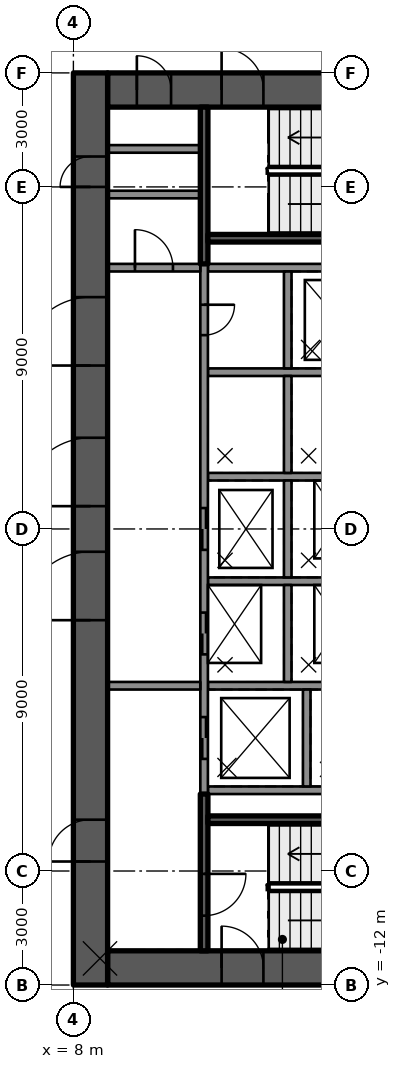
"""IFC4 building model, lengths in metres.
Left out: names, types, materials, properties, quantities, classifications, styles, units other than length and angle.
Written with IfcOpenShell. Run it as: python <this file> out.ifc"""

import sys

from ifc_helpers import new_model, si_unit, direction, frame, frame_2d, origin, place, context, subcontext, project, spatial, rectangle, extrude, element, fill, save


model = new_model("IFC4")
c1 = context("Model", 3, precision=1e-05, world=origin(), true_north=direction((0.0, 1.0)))
c2 = subcontext(c1, "Body", "Model", "MODEL_VIEW")
j1 = project(units=[si_unit("LENGTHUNIT", "METRE"), si_unit("PLANEANGLEUNIT", "RADIAN")], contexts=[c1])
p1 = place(None, origin())
s1 = spatial("IfcSite", under=j1, at=p1, CompositionType="ELEMENT")
p2 = place(p1, origin())
s2 = spatial("IfcBuilding", under=s1, at=p2, CompositionType="ELEMENT")
p3 = place(p2, frame((0.0, 0.0, 76.3)))
s3 = spatial("IfcBuildingStorey", under=s2, at=p3, CompositionType="ELEMENT", Elevation=76.3)
p4 = place(p3, frame((8.9, 11.55, 0.0), z_axis=(0.0, 0.0, 1.0), x_axis=(1.0, 0.0, 0.0)))
e1 = element("IfcWall", 1, at=p4, inside=s3, PredefinedType="SHEAR", context=c2, shape_type="SweptSolid", body=[
    extrude(rectangle(XDim=9.2, YDim=0.9, at=frame_2d((4.6, 0.0))), origin(), (0.0, 0.0, 1.0), 4.4),
])
p5 = place(p4, frame((3.0, 0.0, 0.0)))
e2 = element("IfcOpeningElement", 2, at=p5, cuts=e1, PredefinedType="OPENING", context=c2, shape_type="SweptSolid", body=[
    extrude(rectangle(XDim=1.1, YDim=2.1, at=frame_2d((0.55, 1.05))), frame((0.0, 0.46, 0.0), z_axis=(0.0, -1.0, 0.0), x_axis=(1.0, 0.0, 0.0)), (0.0, 0.0, 1.0), 0.92),
])
p6 = place(p4, frame((0.77, 0.0, 0.0)))
e3 = element("IfcOpeningElement", 3, at=p6, cuts=e1, PredefinedType="OPENING", context=c2, shape_type="SweptSolid", body=[
    extrude(rectangle(XDim=0.9, YDim=2.1, at=frame_2d((0.45, 1.05))), frame((0.0, 0.46, 0.0), z_axis=(0.0, -1.0, 0.0), x_axis=(1.0, 0.0, 0.0)), (0.0, 0.0, 1.0), 0.92),
])
p7 = place(p3, frame((8.9, -11.55, 0.0), z_axis=(0.0, 0.0, 1.0), x_axis=(1.0, 0.0, 0.0)))
e4 = element("IfcWall", 4, at=p7, inside=s3, PredefinedType="SHEAR", context=c2, shape_type="SweptSolid", body=[
    extrude(rectangle(XDim=9.2, YDim=0.9, at=frame_2d((4.6, 0.0))), origin(), (0.0, 0.0, 1.0), 4.4),
])
p8 = place(p7, frame((3.0, 0.0, 0.0)))
e5 = element("IfcOpeningElement", 5, at=p8, cuts=e4, PredefinedType="OPENING", context=c2, shape_type="SweptSolid", body=[
    extrude(rectangle(XDim=1.1, YDim=2.1, at=frame_2d((0.55, 1.05))), frame((0.0, 0.46, 0.0), z_axis=(0.0, -1.0, 0.0), x_axis=(1.0, 0.0, 0.0)), (0.0, 0.0, 1.0), 0.92),
])
p9 = place(p3, frame((8.45, -12.0, 0.0), z_axis=(0.0, 0.0, 1.0), x_axis=(0.0, 1.0, 0.0)))
e6 = element("IfcWall", 6, at=p9, inside=s3, PredefinedType="SHEAR", context=c2, shape_type="SweptSolid", body=[
    extrude(rectangle(XDim=24.0, YDim=0.9, at=frame_2d((12.0, 0.0))), origin(), (0.0, 0.0, 1.0), 4.4),
])
p10 = place(p9, frame((12.6, 0.0, 0.0)))
e7 = element("IfcOpeningElement", 7, at=p10, cuts=e6, PredefinedType="OPENING", context=c2, shape_type="SweptSolid", body=[
    extrude(rectangle(XDim=1.8, YDim=2.1, at=frame_2d((0.9, 1.05))), frame((0.0, 0.46, 0.0), z_axis=(0.0, -1.0, 0.0), x_axis=(1.0, 0.0, 0.0)), (0.0, 0.0, 1.0), 0.92),
])
p11 = place(p9, frame((16.3, 0.0, 0.0)))
e8 = element("IfcOpeningElement", 8, at=p11, cuts=e6, PredefinedType="OPENING", context=c2, shape_type="SweptSolid", body=[
    extrude(rectangle(XDim=1.8, YDim=2.1, at=frame_2d((0.9, 1.05))), frame((0.0, 0.46, 0.0), z_axis=(0.0, -1.0, 0.0), x_axis=(1.0, 0.0, 0.0)), (0.0, 0.0, 1.0), 0.92),
])
p12 = place(p9, frame((9.6, 0.0, 0.0)))
e9 = element("IfcOpeningElement", 9, at=p12, cuts=e6, PredefinedType="OPENING", context=c2, shape_type="SweptSolid", body=[
    extrude(rectangle(XDim=1.8, YDim=2.1, at=frame_2d((0.9, 1.05))), frame((0.0, 0.46, 0.0), z_axis=(0.0, -1.0, 0.0), x_axis=(1.0, 0.0, 0.0)), (0.0, 0.0, 1.0), 0.92),
])
p13 = place(p9, frame((3.25, 0.0, 0.0)))
e10 = element("IfcOpeningElement", 10, at=p13, cuts=e6, PredefinedType="OPENING", context=c2, shape_type="SweptSolid", body=[
    extrude(rectangle(XDim=1.1, YDim=2.1, at=frame_2d((0.55, 1.05))), frame((0.0, 0.46, 0.0), z_axis=(0.0, -1.0, 0.0), x_axis=(1.0, 0.0, 0.0)), (0.0, 0.0, 1.0), 0.92),
])
p14 = place(p9, frame((21.0, 0.0, 0.0)))
e11 = element("IfcOpeningElement", 11, at=p14, cuts=e6, PredefinedType="OPENING", context=c2, shape_type="SweptSolid", body=[
    extrude(rectangle(XDim=0.8, YDim=2.1, at=frame_2d((0.4, 1.05))), frame((0.0, 0.46, 0.0), z_axis=(0.0, -1.0, 0.0), x_axis=(1.0, 0.0, 0.0)), (0.0, 0.0, 1.0), 0.92),
])
for number, where, z_axis, x_axis in (
    (12, (11.54, -6.875, 0.0), (0.0, 0.0, 1.0), (1.0, 0.0, 0.0)),
    (13, (11.54, 6.875, 0.0), (0.0, 0.0, 1.0), (1.0, 0.0, 0.0)),
):
    element("IfcWall", number, at=place(p3, frame(where, z_axis=z_axis, x_axis=x_axis)), inside=s3, PredefinedType="SOLIDWALL", context=c2, shape_type="SweptSolid", body=[
        extrude(rectangle(XDim=6.56, YDim=0.2, at=frame_2d((3.28, 0.0))), origin(), (0.0, 0.0, 1.0), 3.99),
    ])
p15 = place(p3, frame((11.54, 4.125, 0.0), z_axis=(0.0, 0.0, 1.0), x_axis=(1.0, 0.0, 0.0)))
e14 = element("IfcWall", 14, at=p15, inside=s3, PredefinedType="SOLIDWALL", context=c2, shape_type="SweptSolid", body=[
    extrude(rectangle(XDim=4.7, YDim=0.2, at=frame_2d((2.35, 0.0))), origin(), (0.0, 0.0, 1.0), 3.99),
])
for number, where, z_axis, x_axis in (
    (15, (11.54, 1.375, 0.0), (0.0, 0.0, 1.0), (1.0, 0.0, 0.0)),
    (16, (11.54, -1.375, 0.0), (0.0, 0.0, 1.0), (1.0, 0.0, 0.0)),
):
    element("IfcWall", number, at=place(p3, frame(where, z_axis=z_axis, x_axis=x_axis)), inside=s3, PredefinedType="SOLIDWALL", context=c2, shape_type="SweptSolid", body=[
        extrude(rectangle(XDim=4.2, YDim=0.2, at=frame_2d((2.1, 0.0))), origin(), (0.0, 0.0, 1.0), 3.99),
    ])
p16 = place(p3, frame((11.54, -4.125, 0.0), z_axis=(0.0, 0.0, 1.0), x_axis=(1.0, 0.0, 0.0)))
e17 = element("IfcWall", 17, at=p16, inside=s3, PredefinedType="SOLIDWALL", context=c2, shape_type="SweptSolid", body=[
    extrude(rectangle(XDim=4.7, YDim=0.2, at=frame_2d((2.35, 0.0))), origin(), (0.0, 0.0, 1.0), 3.99),
])
p17 = place(p3, frame((11.44, 6.975, 0.0), z_axis=(0.0, 0.0, 1.0), x_axis=(0.0, -1.0, 0.0)))
e18 = element("IfcWall", 18, at=p17, inside=s3, PredefinedType="SOLIDWALL", context=c2, shape_type="SweptSolid", body=[
    extrude(rectangle(XDim=13.95, YDim=0.2, at=frame_2d((6.975, 0.0))), origin(), (0.0, 0.0, 1.0), 3.99),
])
p18 = place(p17, frame((6.425, 0.0, 0.0)))
e19 = element("IfcOpeningElement", 19, at=p18, cuts=e18, PredefinedType="OPENING", context=c2, shape_type="SweptSolid", body=[
    extrude(rectangle(XDim=1.1, YDim=2.1, at=frame_2d((0.55, 1.05))), frame((0.0, 0.11, 0.0), z_axis=(0.0, -1.0, 0.0), x_axis=(1.0, 0.0, 0.0)), (0.0, 0.0, 1.0), 0.22),
])
p19 = place(p17, frame((9.175, 0.0, 0.0)))
e20 = element("IfcOpeningElement", 20, at=p19, cuts=e18, PredefinedType="OPENING", context=c2, shape_type="SweptSolid", body=[
    extrude(rectangle(XDim=1.1, YDim=2.1, at=frame_2d((0.55, 1.05))), frame((0.0, 0.11, 0.0), z_axis=(0.0, -1.0, 0.0), x_axis=(1.0, 0.0, 0.0)), (0.0, 0.0, 1.0), 0.22),
])
p20 = place(p17, frame((11.925, 0.0, 0.0)))
e21 = element("IfcOpeningElement", 21, at=p20, cuts=e18, PredefinedType="OPENING", context=c2, shape_type="SweptSolid", body=[
    extrude(rectangle(XDim=1.1, YDim=2.1, at=frame_2d((0.55, 1.05))), frame((0.0, 0.11, 0.0), z_axis=(0.0, -1.0, 0.0), x_axis=(1.0, 0.0, 0.0)), (0.0, 0.0, 1.0), 0.22),
])
p21 = place(p17, frame((1.075, 0.0, 0.0)))
e22 = element("IfcOpeningElement", 22, at=p21, cuts=e18, PredefinedType="OPENING", context=c2, shape_type="SweptSolid", body=[
    extrude(rectangle(XDim=0.8, YDim=2.1, at=frame_2d((0.4, 1.05))), frame((0.0, 0.11, 0.0), z_axis=(0.0, -1.0, 0.0), x_axis=(1.0, 0.0, 0.0)), (0.0, 0.0, 1.0), 0.22),
])
for number, where, z_axis, x_axis in (
    (23, (13.64, 6.775, 0.0), (0.0, 0.0, 1.0), (0.0, -1.0, 0.0)),
    (24, (13.64, 4.025, 0.0), (0.0, 0.0, 1.0), (0.0, -1.0, 0.0)),
    (25, (13.64, 1.275, 0.0), (0.0, 0.0, 1.0), (0.0, -1.0, 0.0)),
    (26, (13.64, -1.475, 0.0), (0.0, 0.0, 1.0), (0.0, -1.0, 0.0)),
    (27, (14.14, -4.225, 0.0), (0.0, 0.0, 1.0), (0.0, -1.0, 0.0)),
):
    element("IfcWall", number, at=place(p3, frame(where, z_axis=z_axis, x_axis=x_axis)), inside=s3, PredefinedType="SOLIDWALL", context=c2, shape_type="SweptSolid", body=[
        extrude(rectangle(XDim=2.55, YDim=0.2, at=frame_2d((1.275, 0.0))), origin(), (0.0, 0.0, 1.0), 3.99),
    ])
p22 = place(p3, frame((11.44, -6.975, 0.0), z_axis=(0.0, 0.0, 1.0), x_axis=(0.0, -1.0, 0.0)))
e28 = element("IfcWall", 28, at=p22, inside=s3, PredefinedType="SOLIDWALL", context=c2, shape_type="SweptSolid", body=[
    extrude(rectangle(XDim=4.125, YDim=0.2, at=frame_2d((2.062, 0.0))), origin(), (0.0, 0.0, 1.0), 3.99),
])
p23 = place(p22, frame((2.1, 0.0, 0.0)))
e29 = element("IfcOpeningElement", 29, at=p23, cuts=e28, PredefinedType="OPENING", context=c2, shape_type="SweptSolid", body=[
    extrude(rectangle(XDim=1.1, YDim=2.1, at=frame_2d((0.55, 1.05))), frame((0.0, 0.11, 0.0), z_axis=(0.0, -1.0, 0.0), x_axis=(1.0, 0.0, 0.0)), (0.0, 0.0, 1.0), 0.22),
])
p24 = place(p3, frame((11.54, -7.65, 0.0), z_axis=(0.0, 0.0, 1.0), x_axis=(1.0, 0.0, 0.0)))
e30 = element("IfcWall", 30, at=p24, inside=s3, PredefinedType="SOLIDWALL", context=c2, shape_type="SweptSolid", body=[
    extrude(rectangle(XDim=6.56, YDim=0.2, at=frame_2d((3.28, 0.0))), origin(), (0.0, 0.0, 1.0), 3.99),
])
p25 = place(p3, frame((11.44, 11.1, 0.0), z_axis=(0.0, 0.0, 1.0), x_axis=(0.0, -1.0, 0.0)))
e31 = element("IfcWall", 31, at=p25, inside=s3, PredefinedType="SOLIDWALL", context=c2, shape_type="SweptSolid", body=[
    extrude(rectangle(XDim=4.125, YDim=0.2, at=frame_2d((2.062, 0.0))), origin(), (0.0, 0.0, 1.0), 3.99),
])
p26 = place(p3, frame((11.54, 7.65, 0.0), z_axis=(0.0, 0.0, 1.0), x_axis=(1.0, 0.0, 0.0)))
e32 = element("IfcWall", 32, at=p26, inside=s3, PredefinedType="SOLIDWALL", context=c2, shape_type="SweptSolid", body=[
    extrude(rectangle(XDim=6.56, YDim=0.2, at=frame_2d((3.28, 0.0))), origin(), (0.0, 0.0, 1.0), 3.99),
])
p27 = place(p3, frame((8.9, -4.125, 0.0), z_axis=(0.0, 0.0, 1.0), x_axis=(1.0, 0.0, 0.0)))
e33 = element("IfcWall", 33, at=p27, inside=s3, PredefinedType="PARTITIONING", context=c2, shape_type="SweptSolid", body=[
    extrude(rectangle(XDim=2.44, YDim=0.2, at=frame_2d((1.22, 0.0))), origin(), (0.0, 0.0, 1.0), 3.99),
])
p28 = place(p3, frame((8.9, 6.875, 0.0), z_axis=(0.0, 0.0, 1.0), x_axis=(1.0, 0.0, 0.0)))
e34 = element("IfcWall", 34, at=p28, inside=s3, PredefinedType="PARTITIONING", context=c2, shape_type="SweptSolid", body=[
    extrude(rectangle(XDim=2.44, YDim=0.2, at=frame_2d((1.22, 0.0))), origin(), (0.0, 0.0, 1.0), 3.99),
])
p29 = place(p28, frame((0.72, 0.0, 0.0)))
e35 = element("IfcOpeningElement", 35, at=p29, cuts=e34, PredefinedType="OPENING", context=c2, shape_type="SweptSolid", body=[
    extrude(rectangle(XDim=1.0, YDim=2.1, at=frame_2d((0.5, 1.05))), frame((0.0, 0.11, 0.0), z_axis=(0.0, -1.0, 0.0), x_axis=(1.0, 0.0, 0.0)), (0.0, 0.0, 1.0), 0.22),
])
for number, where, z_axis, x_axis in (
    (36, (8.9, 10.0, 0.0), (0.0, 0.0, 1.0), (1.0, 0.0, 0.0)),
    (37, (8.9, 8.8, 0.0), (0.0, 0.0, 1.0), (1.0, 0.0, 0.0)),
):
    element("IfcWall", number, at=place(p3, frame(where, z_axis=z_axis, x_axis=x_axis)), inside=s3, PredefinedType="PARTITIONING", context=c2, shape_type="SweptSolid", body=[
        extrude(rectangle(XDim=2.44, YDim=0.2, at=frame_2d((1.22, 0.0))), origin(), (0.0, 0.0, 1.0), 3.99),
    ])
p30 = place(p18, origin())
e38 = element("IfcDoor", 38, at=p30, inside=s3, OperationType="DOUBLE_DOOR_SLIDING", PredefinedType="DOOR", context=c2, shape_type="SweptSolid", body=[
    extrude(rectangle(XDim=1.1, YDim=2.1, at=frame_2d((0.55, 1.05))), frame((0.0, 0.025, 0.0), z_axis=(0.0, -1.0, 0.0), x_axis=(1.0, 0.0, 0.0)), (0.0, 0.0, 1.0), 0.05),
])
fill(e19, e38)
p31 = place(p19, origin())
e39 = element("IfcDoor", 39, at=p31, inside=s3, OperationType="DOUBLE_DOOR_SLIDING", PredefinedType="DOOR", context=c2, shape_type="SweptSolid", body=[
    extrude(rectangle(XDim=1.1, YDim=2.1, at=frame_2d((0.55, 1.05))), frame((0.0, 0.025, 0.0), z_axis=(0.0, -1.0, 0.0), x_axis=(1.0, 0.0, 0.0)), (0.0, 0.0, 1.0), 0.05),
])
fill(e20, e39)
p32 = place(p20, origin())
e40 = element("IfcDoor", 40, at=p32, inside=s3, OperationType="DOUBLE_DOOR_SLIDING", PredefinedType="DOOR", context=c2, shape_type="SweptSolid", body=[
    extrude(rectangle(XDim=1.1, YDim=2.1, at=frame_2d((0.55, 1.05))), frame((0.0, 0.025, 0.0), z_axis=(0.0, -1.0, 0.0), x_axis=(1.0, 0.0, 0.0)), (0.0, 0.0, 1.0), 0.05),
])
fill(e21, e40)
p33 = place(p21, origin())
e41 = element("IfcDoor", 41, at=p33, inside=s3, OperationType="SINGLE_SWING_LEFT", PredefinedType="DOOR", context=c2, shape_type="SweptSolid", body=[
    extrude(rectangle(XDim=0.8, YDim=2.1, at=frame_2d((0.4, 1.05))), frame((0.0, 0.025, 0.0), z_axis=(0.0, -1.0, 0.0), x_axis=(1.0, 0.0, 0.0)), (0.0, 0.0, 1.0), 0.05),
])
fill(e22, e41)
p34 = place(p10, origin())
e42 = element("IfcDoor", 42, at=p34, inside=s3, OperationType="SINGLE_SWING_RIGHT", PredefinedType="DOOR", context=c2, shape_type="SweptSolid", body=[
    extrude(rectangle(XDim=1.8, YDim=2.1, at=frame_2d((0.9, 1.05))), frame((0.0, 0.025, 0.0), z_axis=(0.0, -1.0, 0.0), x_axis=(1.0, 0.0, 0.0)), (0.0, 0.0, 1.0), 0.05),
])
fill(e7, e42)
p35 = place(p11, origin())
e43 = element("IfcDoor", 43, at=p35, inside=s3, OperationType="SINGLE_SWING_RIGHT", PredefinedType="DOOR", context=c2, shape_type="SweptSolid", body=[
    extrude(rectangle(XDim=1.8, YDim=2.1, at=frame_2d((0.9, 1.05))), frame((0.0, 0.025, 0.0), z_axis=(0.0, -1.0, 0.0), x_axis=(1.0, 0.0, 0.0)), (0.0, 0.0, 1.0), 0.05),
])
fill(e8, e43)
p36 = place(p12, origin())
e44 = element("IfcDoor", 44, at=p36, inside=s3, OperationType="SINGLE_SWING_LEFT", PredefinedType="DOOR", context=c2, shape_type="SweptSolid", body=[
    extrude(rectangle(XDim=1.8, YDim=2.1, at=frame_2d((0.9, 1.05))), frame((0.0, 0.025, 0.0), z_axis=(0.0, -1.0, 0.0), x_axis=(1.0, 0.0, 0.0)), (0.0, 0.0, 1.0), 0.05),
])
fill(e9, e44)
p37 = place(p13, origin())
e45 = element("IfcDoor", 45, at=p37, inside=s3, OperationType="SINGLE_SWING_LEFT", PredefinedType="DOOR", context=c2, shape_type="SweptSolid", body=[
    extrude(rectangle(XDim=1.1, YDim=2.1, at=frame_2d((0.55, 1.05))), frame((0.0, 0.025, 0.0), z_axis=(0.0, -1.0, 0.0), x_axis=(1.0, 0.0, 0.0)), (0.0, 0.0, 1.0), 0.05),
])
fill(e10, e45)
p38 = place(p8, origin())
e46 = element("IfcDoor", 46, at=p38, inside=s3, OperationType="SINGLE_SWING_LEFT", PredefinedType="DOOR", context=c2, shape_type="SweptSolid", body=[
    extrude(rectangle(XDim=1.1, YDim=2.1, at=frame_2d((0.55, 1.05))), frame((0.0, 0.025, 0.0), z_axis=(0.0, -1.0, 0.0), x_axis=(1.0, 0.0, 0.0)), (0.0, 0.0, 1.0), 0.05),
])
fill(e5, e46)
p39 = place(p5, origin())
e47 = element("IfcDoor", 47, at=p39, inside=s3, OperationType="SINGLE_SWING_LEFT", PredefinedType="DOOR", context=c2, shape_type="SweptSolid", body=[
    extrude(rectangle(XDim=1.1, YDim=2.1, at=frame_2d((0.55, 1.05))), frame((0.0, 0.025, 0.0), z_axis=(0.0, -1.0, 0.0), x_axis=(1.0, 0.0, 0.0)), (0.0, 0.0, 1.0), 0.05),
])
fill(e2, e47)
p40 = place(p23, origin())
e48 = element("IfcDoor", 48, at=p40, inside=s3, OperationType="SINGLE_SWING_RIGHT", PredefinedType="DOOR", context=c2, shape_type="SweptSolid", body=[
    extrude(rectangle(XDim=1.1, YDim=2.1, at=frame_2d((0.55, 1.05))), frame((0.0, 0.025, 0.0), z_axis=(0.0, -1.0, 0.0), x_axis=(1.0, 0.0, 0.0)), (0.0, 0.0, 1.0), 0.05),
])
fill(e29, e48)
p41 = place(p6, origin())
e49 = element("IfcDoor", 49, at=p41, inside=s3, OperationType="SINGLE_SWING_LEFT", PredefinedType="DOOR", context=c2, shape_type="SweptSolid", body=[
    extrude(rectangle(XDim=0.9, YDim=2.1, at=frame_2d((0.45, 1.05))), frame((0.0, 0.025, 0.0), z_axis=(0.0, -1.0, 0.0), x_axis=(1.0, 0.0, 0.0)), (0.0, 0.0, 1.0), 0.05),
])
fill(e3, e49)
p42 = place(p14, origin())
e50 = element("IfcDoor", 50, at=p42, inside=s3, OperationType="SINGLE_SWING_RIGHT", PredefinedType="DOOR", context=c2, shape_type="SweptSolid", body=[
    extrude(rectangle(XDim=0.8, YDim=2.1, at=frame_2d((0.4, 1.05))), frame((0.0, 0.025, 0.0), z_axis=(0.0, -1.0, 0.0), x_axis=(1.0, 0.0, 0.0)), (0.0, 0.0, 1.0), 0.05),
])
fill(e11, e50)
p43 = place(p29, origin())
e51 = element("IfcDoor", 51, at=p43, inside=s3, OperationType="SINGLE_SWING_RIGHT", PredefinedType="DOOR", context=c2, shape_type="SweptSolid", body=[
    extrude(rectangle(XDim=1.0, YDim=2.1, at=frame_2d((0.5, 1.05))), frame((0.0, 0.025, 0.0), z_axis=(0.0, -1.0, 0.0), x_axis=(1.0, 0.0, 0.0)), (0.0, 0.0, 1.0), 0.05),
])
fill(e35, e51)
save(model, sys.argv[1])
